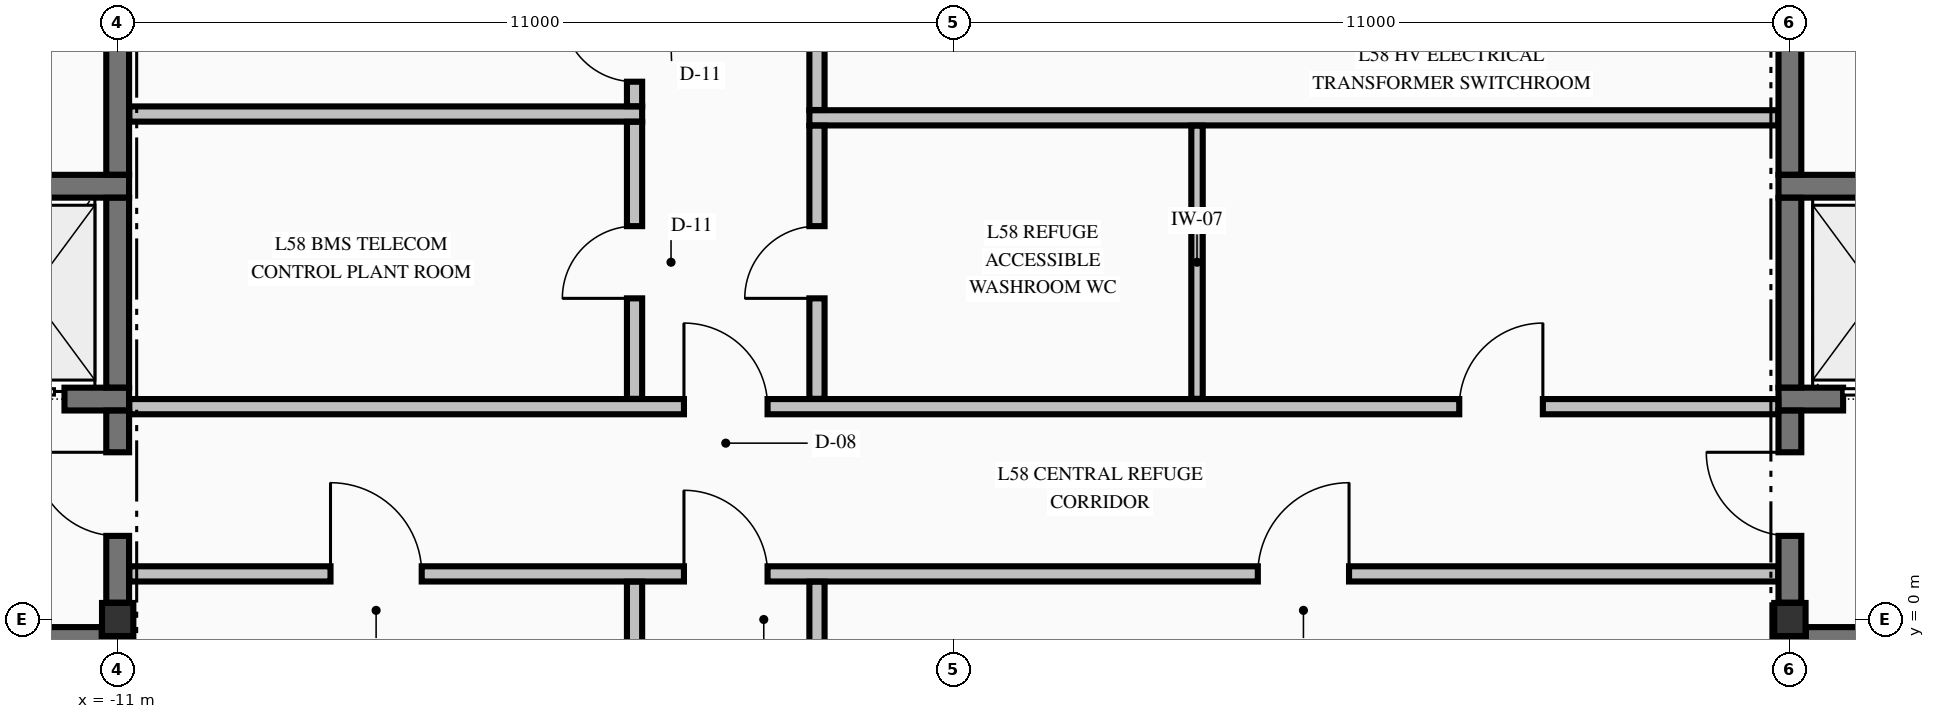
"""IFC4 building model, lengths in metres.
Left out: names, types, materials, properties, quantities, classifications, styles, units other than length and angle.
Written with IfcOpenShell. Run it as: python <this file> out.ifc"""

import sys

from ifc_helpers import new_model, si_unit, direction, frame, frame_2d, origin, origin_2d, place, context, subcontext, project, spatial, rectangle, i_section, extrude, element, fill, save


model = new_model("IFC4")
c1 = context("Model", 3, precision=1e-05, world=origin(), true_north=direction((0.0, 1.0)))
c2 = subcontext(c1, "Body", "Model", "MODEL_VIEW")
j1 = project(units=[si_unit("LENGTHUNIT", "METRE"), si_unit("PLANEANGLEUNIT", "RADIAN")], contexts=[c1])
p1 = place(None, origin())
s1 = spatial("IfcSite", under=j1, at=p1, CompositionType="ELEMENT")
p2 = place(p1, origin())
s2 = spatial("IfcBuilding", under=s1, at=p2, CompositionType="ELEMENT")
p3 = place(p2, frame((0.0, 0.0, 222.06)))
s3 = spatial("IfcBuildingStorey", under=s2, at=p3, CompositionType="ELEMENT", Elevation=222.06)
for number, where, z_axis, x_axis in (
    (1, (-11.0, 0.0, -0.425), (0.0, 0.0, 1.0), (1.0, 0.0, 0.0)),
    (2, (11.0, 0.0, -0.425), (0.0, 0.0, 1.0), (1.0, 0.0, 0.0)),
):
    element("IfcColumn", number, at=place(p3, frame(where, z_axis=z_axis, x_axis=x_axis)), inside=s3, PredefinedType="COLUMN", context=c2, shape_type="SweptSolid", body=[
        extrude(i_section(OverallWidth=0.412, OverallDepth=0.435, WebThickness=0.036, FlangeThickness=0.058, FilletRadius=0.015, at=origin_2d()), origin(), (0.0, 0.0, 1.0), 4.76),
    ])
p4 = place(p3, frame((-19.79, -0.25, 0.0), z_axis=(0.0, 0.0, 1.0), x_axis=(1.0, 0.0, 0.0)))
e3 = element("IfcWall", 3, at=p4, inside=s3, PredefinedType="SHEAR", context=c2, shape_type="SweptSolid", body=[
    extrude(rectangle(XDim=8.58, YDim=0.3, at=frame_2d((4.29, 0.0))), origin(), (0.0, 0.0, 1.0), 4.335),
])
p5 = place(p4, frame((6.09, 0.0, 0.0)))
e4 = element("IfcOpeningElement", 4, at=p5, cuts=e3, PredefinedType="OPENING", context=c2, shape_type="SweptSolid", body=[
    extrude(rectangle(XDim=1.1, YDim=2.15, at=frame_2d((0.55, 1.075))), frame((0.0, 0.16, 0.0), z_axis=(0.0, -1.0, 0.0), x_axis=(1.0, 0.0, 0.0)), (0.0, 0.0, 1.0), 0.32),
])
p6 = place(p3, frame((11.21, -0.25, 0.0), z_axis=(0.0, 0.0, 1.0), x_axis=(1.0, 0.0, 0.0)))
e5 = element("IfcWall", 5, at=p6, inside=s3, PredefinedType="SHEAR", context=c2, shape_type="SweptSolid", body=[
    extrude(rectangle(XDim=3.665, YDim=0.3, at=frame_2d((1.833, 0.0))), origin(), (0.0, 0.0, 1.0), 4.335),
])
p7 = place(p6, frame((1.39, 0.0, 0.0)))
e6 = element("IfcOpeningElement", 6, at=p7, cuts=e5, PredefinedType="OPENING", context=c2, shape_type="SweptSolid", body=[
    extrude(rectangle(XDim=1.1, YDim=2.15, at=frame_2d((0.55, 1.075))), frame((0.0, 0.16, 0.0), z_axis=(0.0, -1.0, 0.0), x_axis=(1.0, 0.0, 0.0)), (0.0, 0.0, 1.0), 0.32),
])
p8 = place(p3, frame((-14.875, 2.9, 0.0), z_axis=(0.0, 0.0, 1.0), x_axis=(1.0, 0.0, 0.0)))
e7 = element("IfcWall", 7, at=p8, inside=s3, PredefinedType="SHEAR", context=c2, shape_type="SweptSolid", body=[
    extrude(rectangle(XDim=4.025, YDim=0.3, at=frame_2d((2.012, 0.0))), origin(), (0.0, 0.0, 1.0), 4.335),
])
p9 = place(p8, frame((2.075, 0.0, 0.0)))
e8 = element("IfcOpeningElement", 8, at=p9, cuts=e7, PredefinedType="OPENING", context=c2, shape_type="SweptSolid", body=[
    extrude(rectangle(XDim=1.1, YDim=2.2, at=frame_2d((0.55, 1.1))), frame((0.0, 0.16, 0.0), z_axis=(0.0, -1.0, 0.0), x_axis=(1.0, 0.0, 0.0)), (0.0, 0.0, 1.0), 0.32),
])
p10 = place(p3, frame((10.85, 2.9, 0.0), z_axis=(0.0, 0.0, 1.0), x_axis=(1.0, 0.0, 0.0)))
e9 = element("IfcWall", 9, at=p10, inside=s3, PredefinedType="SHEAR", context=c2, shape_type="SweptSolid", body=[
    extrude(rectangle(XDim=4.025, YDim=0.3, at=frame_2d((2.012, 0.0))), origin(), (0.0, 0.0, 1.0), 4.335),
])
p11 = place(p10, frame((0.85, 0.0, 0.0)))
e10 = element("IfcOpeningElement", 10, at=p11, cuts=e9, PredefinedType="OPENING", context=c2, shape_type="SweptSolid", body=[
    extrude(rectangle(XDim=1.1, YDim=2.2, at=frame_2d((0.55, 1.1))), frame((0.0, 0.16, 0.0), z_axis=(0.0, -1.0, 0.0), x_axis=(1.0, 0.0, 0.0)), (0.0, 0.0, 1.0), 0.32),
])
for number, where, z_axis, x_axis in (
    (11, (-14.875, 5.7, 0.0), (0.0, 0.0, 1.0), (1.0, 0.0, 0.0)),
    (12, (10.85, 5.7, 0.0), (0.0, 0.0, 1.0), (1.0, 0.0, 0.0)),
):
    element("IfcWall", number, at=place(p3, frame(where, z_axis=z_axis, x_axis=x_axis)), inside=s3, PredefinedType="SHEAR", context=c2, shape_type="SweptSolid", body=[
        extrude(rectangle(XDim=4.025, YDim=0.3, at=frame_2d((2.012, 0.0))), origin(), (0.0, 0.0, 1.0), 4.335),
    ])
p12 = place(p3, frame((-10.847, 0.6, 0.0), z_axis=(0.0, 0.0, 1.0), x_axis=(1.0, 0.0, 0.0)))
e13 = element("IfcWall", 13, at=p12, inside=s3, PredefinedType="PARTITIONING", context=c2, shape_type="SweptSolid", body=[
    extrude(rectangle(XDim=21.694, YDim=0.2, at=frame_2d((10.847, 0.0))), origin(), (0.0, 0.0, 1.0), 4.335),
])
p13 = place(p12, frame((7.297, 0.0, 0.0)))
e14 = element("IfcOpeningElement", 14, at=p13, cuts=e13, PredefinedType="OPENING", context=c2, shape_type="SweptSolid", body=[
    extrude(rectangle(XDim=1.1, YDim=2.15, at=frame_2d((0.55, 1.075))), frame((0.0, 0.11, 0.0), z_axis=(0.0, -1.0, 0.0), x_axis=(1.0, 0.0, 0.0)), (0.0, 0.0, 1.0), 0.22),
])
p14 = place(p12, frame((2.647, 0.0, 0.0)))
e15 = element("IfcOpeningElement", 15, at=p14, cuts=e13, PredefinedType="OPENING", context=c2, shape_type="SweptSolid", body=[
    extrude(rectangle(XDim=1.2, YDim=2.15, at=frame_2d((0.6, 1.075))), frame((0.0, 0.11, 0.0), z_axis=(0.0, -1.0, 0.0), x_axis=(1.0, 0.0, 0.0)), (0.0, 0.0, 1.0), 0.22),
])
p15 = place(p12, frame((14.847, 0.0, 0.0)))
e16 = element("IfcOpeningElement", 16, at=p15, cuts=e13, PredefinedType="OPENING", context=c2, shape_type="SweptSolid", body=[
    extrude(rectangle(XDim=1.2, YDim=2.15, at=frame_2d((0.6, 1.075))), frame((0.0, 0.11, 0.0), z_axis=(0.0, -1.0, 0.0), x_axis=(1.0, 0.0, 0.0)), (0.0, 0.0, 1.0), 0.22),
])
p16 = place(p3, frame((-10.847, 2.8, 0.0), z_axis=(0.0, 0.0, 1.0), x_axis=(1.0, 0.0, 0.0)))
e17 = element("IfcWall", 17, at=p16, inside=s3, PredefinedType="PARTITIONING", context=c2, shape_type="SweptSolid", body=[
    extrude(rectangle(XDim=21.694, YDim=0.2, at=frame_2d((10.847, 0.0))), origin(), (0.0, 0.0, 1.0), 4.335),
])
p17 = place(p16, frame((7.297, 0.0, 0.0)))
e18 = element("IfcOpeningElement", 18, at=p17, cuts=e17, PredefinedType="OPENING", context=c2, shape_type="SweptSolid", body=[
    extrude(rectangle(XDim=1.1, YDim=2.15, at=frame_2d((0.55, 1.075))), frame((0.0, 0.11, 0.0), z_axis=(0.0, -1.0, 0.0), x_axis=(1.0, 0.0, 0.0)), (0.0, 0.0, 1.0), 0.22),
])
p18 = place(p16, frame((17.497, 0.0, 0.0)))
e19 = element("IfcOpeningElement", 19, at=p18, cuts=e17, PredefinedType="OPENING", context=c2, shape_type="SweptSolid", body=[
    extrude(rectangle(XDim=1.1, YDim=2.15, at=frame_2d((0.55, 1.075))), frame((0.0, 0.11, 0.0), z_axis=(0.0, -1.0, 0.0), x_axis=(1.0, 0.0, 0.0)), (0.0, 0.0, 1.0), 0.22),
])
p19 = place(p3, frame((-1.9, 6.6, 0.0), z_axis=(0.0, 0.0, 1.0), x_axis=(1.0, 0.0, 0.0)))
e20 = element("IfcWall", 20, at=p19, inside=s3, PredefinedType="PARTITIONING", context=c2, shape_type="SweptSolid", body=[
    extrude(rectangle(XDim=12.747, YDim=0.2, at=frame_2d((6.374, 0.0))), origin(), (0.0, 0.0, 1.0), 4.335),
])
p20 = place(p3, frame((-10.847, 6.65, 0.0), z_axis=(0.0, 0.0, 1.0), x_axis=(1.0, 0.0, 0.0)))
e21 = element("IfcWall", 21, at=p20, inside=s3, PredefinedType="PARTITIONING", context=c2, shape_type="SweptSolid", body=[
    extrude(rectangle(XDim=6.747, YDim=0.2, at=frame_2d((3.374, 0.0))), origin(), (0.0, 0.0, 1.0), 4.335),
])
p21 = place(p3, frame((-11.0, -9.729, 0.0), z_axis=(0.0, 0.0, 1.0), x_axis=(0.0, 1.0, 0.0)))
e22 = element("IfcWall", 22, at=p21, inside=s3, PredefinedType="SHEAR", context=c2, shape_type="SweptSolid", body=[
    extrude(rectangle(XDim=9.507, YDim=0.3, at=frame_2d((4.753, 0.0))), origin(), (0.0, 0.0, 1.0), 4.335),
])
p22 = place(p3, frame((-11.0, 0.221, 0.0), z_axis=(0.0, 0.0, 1.0), x_axis=(0.0, 1.0, 0.0)))
e23 = element("IfcWall", 23, at=p22, inside=s3, PredefinedType="SHEAR", context=c2, shape_type="SweptSolid", body=[
    extrude(rectangle(XDim=2.527, YDim=0.3, at=frame_2d((1.263, 0.0))), origin(), (0.0, 0.0, 1.0), 4.335),
])
p23 = place(p22, frame((0.878, 0.0, 0.0)))
e24 = element("IfcOpeningElement", 24, at=p23, cuts=e23, PredefinedType="OPENING", context=c2, shape_type="SweptSolid", body=[
    extrude(rectangle(XDim=1.1, YDim=2.15, at=frame_2d((0.55, 1.075))), frame((0.0, 0.16, 0.0), z_axis=(0.0, -1.0, 0.0), x_axis=(1.0, 0.0, 0.0)), (0.0, 0.0, 1.0), 0.32),
])
p24 = place(p3, frame((-11.0, 3.052, 0.0), z_axis=(0.0, 0.0, 1.0), x_axis=(0.0, 1.0, 0.0)))
e25 = element("IfcWall", 25, at=p24, inside=s3, PredefinedType="SHEAR", context=c2, shape_type="SweptSolid", body=[
    extrude(rectangle(XDim=2.496, YDim=0.3, at=frame_2d((1.248, 0.0))), origin(), (0.0, 0.0, 1.0), 4.335),
])
p25 = place(p3, frame((-11.0, 5.852, 0.0), z_axis=(0.0, 0.0, 1.0), x_axis=(0.0, 1.0, 0.0)))
e26 = element("IfcWall", 26, at=p25, inside=s3, PredefinedType="SHEAR", context=c2, shape_type="SweptSolid", body=[
    extrude(rectangle(XDim=4.427, YDim=0.3, at=frame_2d((2.213, 0.0))), origin(), (0.0, 0.0, 1.0), 4.335),
])
p26 = place(p3, frame((11.0, -9.729, 0.0), z_axis=(0.0, 0.0, 1.0), x_axis=(0.0, 1.0, 0.0)))
e27 = element("IfcWall", 27, at=p26, inside=s3, PredefinedType="SHEAR", context=c2, shape_type="SweptSolid", body=[
    extrude(rectangle(XDim=9.507, YDim=0.3, at=frame_2d((4.753, 0.0))), origin(), (0.0, 0.0, 1.0), 4.335),
])
p27 = place(p3, frame((11.0, 0.221, 0.0), z_axis=(0.0, 0.0, 1.0), x_axis=(0.0, 1.0, 0.0)))
e28 = element("IfcWall", 28, at=p27, inside=s3, PredefinedType="SHEAR", context=c2, shape_type="SweptSolid", body=[
    extrude(rectangle(XDim=2.527, YDim=0.3, at=frame_2d((1.263, 0.0))), origin(), (0.0, 0.0, 1.0), 4.335),
])
p28 = place(p27, frame((0.878, 0.0, 0.0)))
e29 = element("IfcOpeningElement", 29, at=p28, cuts=e28, PredefinedType="OPENING", context=c2, shape_type="SweptSolid", body=[
    extrude(rectangle(XDim=1.1, YDim=2.15, at=frame_2d((0.55, 1.075))), frame((0.0, 0.16, 0.0), z_axis=(0.0, -1.0, 0.0), x_axis=(1.0, 0.0, 0.0)), (0.0, 0.0, 1.0), 0.32),
])
p29 = place(p3, frame((11.0, 3.052, 0.0), z_axis=(0.0, 0.0, 1.0), x_axis=(0.0, 1.0, 0.0)))
e30 = element("IfcWall", 30, at=p29, inside=s3, PredefinedType="SHEAR", context=c2, shape_type="SweptSolid", body=[
    extrude(rectangle(XDim=2.496, YDim=0.3, at=frame_2d((1.248, 0.0))), origin(), (0.0, 0.0, 1.0), 4.335),
])
p30 = place(p3, frame((11.0, 5.852, 0.0), z_axis=(0.0, 0.0, 1.0), x_axis=(0.0, 1.0, 0.0)))
e31 = element("IfcWall", 31, at=p30, inside=s3, PredefinedType="SHEAR", context=c2, shape_type="SweptSolid", body=[
    extrude(rectangle(XDim=4.427, YDim=0.3, at=frame_2d((2.213, 0.0))), origin(), (0.0, 0.0, 1.0), 4.335),
])
p31 = place(p3, frame((-4.2, -9.847, 0.0), z_axis=(0.0, 0.0, 1.0), x_axis=(0.0, 1.0, 0.0)))
e32 = element("IfcWall", 32, at=p31, inside=s3, PredefinedType="PARTITIONING", context=c2, shape_type="SweptSolid", body=[
    extrude(rectangle(XDim=10.344, YDim=0.2, at=frame_2d((5.172, 0.0))), origin(), (0.0, 0.0, 1.0), 4.335),
])
p32 = place(p3, frame((-4.2, 2.903, 0.0), z_axis=(0.0, 0.0, 1.0), x_axis=(0.0, 1.0, 0.0)))
e33 = element("IfcWall", 33, at=p32, inside=s3, PredefinedType="PARTITIONING", context=c2, shape_type="SweptSolid", body=[
    extrude(rectangle(XDim=3.644, YDim=0.2, at=frame_2d((1.822, 0.0))), origin(), (0.0, 0.0, 1.0), 4.335),
])
p33 = place(p32, frame((1.322, 0.0, 0.0)))
e34 = element("IfcOpeningElement", 34, at=p33, cuts=e33, PredefinedType="OPENING", context=c2, shape_type="SweptSolid", body=[
    extrude(rectangle(XDim=0.95, YDim=2.15, at=frame_2d((0.475, 1.075))), frame((0.0, 0.11, 0.0), z_axis=(0.0, -1.0, 0.0), x_axis=(1.0, 0.0, 0.0)), (0.0, 0.0, 1.0), 0.22),
])
p34 = place(p3, frame((-4.2, 6.753, 0.0), z_axis=(0.0, 0.0, 1.0), x_axis=(0.0, 1.0, 0.0)))
e35 = element("IfcWall", 35, at=p34, inside=s3, PredefinedType="PARTITIONING", context=c2, shape_type="SweptSolid", body=[
    extrude(rectangle(XDim=3.644, YDim=0.2, at=frame_2d((1.822, 0.0))), origin(), (0.0, 0.0, 1.0), 4.335),
])
p35 = place(p34, frame((0.322, 0.0, 0.0)))
e36 = element("IfcOpeningElement", 36, at=p35, cuts=e35, PredefinedType="OPENING", context=c2, shape_type="SweptSolid", body=[
    extrude(rectangle(XDim=0.95, YDim=2.15, at=frame_2d((0.475, 1.075))), frame((0.0, 0.11, 0.0), z_axis=(0.0, -1.0, 0.0), x_axis=(1.0, 0.0, 0.0)), (0.0, 0.0, 1.0), 0.22),
])
p36 = place(p3, frame((-1.8, -9.847, 0.0), z_axis=(0.0, 0.0, 1.0), x_axis=(0.0, 1.0, 0.0)))
e37 = element("IfcWall", 37, at=p36, inside=s3, PredefinedType="PARTITIONING", context=c2, shape_type="SweptSolid", body=[
    extrude(rectangle(XDim=10.344, YDim=0.2, at=frame_2d((5.172, 0.0))), origin(), (0.0, 0.0, 1.0), 4.335),
])
p37 = place(p3, frame((-1.8, 2.903, 0.0), z_axis=(0.0, 0.0, 1.0), x_axis=(0.0, 1.0, 0.0)))
e38 = element("IfcWall", 38, at=p37, inside=s3, PredefinedType="PARTITIONING", context=c2, shape_type="SweptSolid", body=[
    extrude(rectangle(XDim=3.594, YDim=0.2, at=frame_2d((1.797, 0.0))), origin(), (0.0, 0.0, 1.0), 4.335),
])
p38 = place(p37, frame((1.322, 0.0, 0.0)))
e39 = element("IfcOpeningElement", 39, at=p38, cuts=e38, PredefinedType="OPENING", context=c2, shape_type="SweptSolid", body=[
    extrude(rectangle(XDim=0.95, YDim=2.15, at=frame_2d((0.475, 1.075))), frame((0.0, 0.11, 0.0), z_axis=(0.0, -1.0, 0.0), x_axis=(1.0, 0.0, 0.0)), (0.0, 0.0, 1.0), 0.22),
])
p39 = place(p3, frame((-1.8, 6.703, 0.0), z_axis=(0.0, 0.0, 1.0), x_axis=(0.0, 1.0, 0.0)))
e40 = element("IfcWall", 40, at=p39, inside=s3, PredefinedType="PARTITIONING", context=c2, shape_type="SweptSolid", body=[
    extrude(rectangle(XDim=3.694, YDim=0.2, at=frame_2d((1.847, 0.0))), origin(), (0.0, 0.0, 1.0), 4.335),
])
p40 = place(p3, frame((3.2, 2.903, 0.0), z_axis=(0.0, 0.0, 1.0), x_axis=(0.0, 1.0, 0.0)))
e41 = element("IfcWall", 41, at=p40, inside=s3, PredefinedType="PARTITIONING", context=c2, shape_type="SweptSolid", body=[
    extrude(rectangle(XDim=3.594, YDim=0.15, at=frame_2d((1.797, 0.0))), origin(), (0.0, 0.0, 1.0), 4.335),
])
p41 = place(p23, origin())
e42 = element("IfcDoor", 42, at=p41, inside=s3, OperationType="SINGLE_SWING_RIGHT", PredefinedType="DOOR", context=c2, shape_type="SweptSolid", body=[
    extrude(rectangle(XDim=1.1, YDim=2.15, at=frame_2d((0.55, 1.075))), frame((0.0, 0.025, 0.0), z_axis=(0.0, -1.0, 0.0), x_axis=(1.0, 0.0, 0.0)), (0.0, 0.0, 1.0), 0.05),
])
fill(e24, e42)
p42 = place(p9, origin())
e43 = element("IfcDoor", 43, at=p42, inside=s3, OperationType="SLIDING_TO_LEFT", PredefinedType="DOOR", context=c2, shape_type="SweptSolid", body=[
    extrude(rectangle(XDim=1.1, YDim=2.2, at=frame_2d((0.55, 1.1))), frame((0.0, 0.025, 0.0), z_axis=(0.0, -1.0, 0.0), x_axis=(1.0, 0.0, 0.0)), (0.0, 0.0, 1.0), 0.05),
])
fill(e8, e43)
p43 = place(p28, origin())
e44 = element("IfcDoor", 44, at=p43, inside=s3, OperationType="SINGLE_SWING_RIGHT", PredefinedType="DOOR", context=c2, shape_type="SweptSolid", body=[
    extrude(rectangle(XDim=1.1, YDim=2.15, at=frame_2d((0.55, 1.075))), frame((0.0, 0.025, 0.0), z_axis=(0.0, -1.0, 0.0), x_axis=(1.0, 0.0, 0.0)), (0.0, 0.0, 1.0), 0.05),
])
fill(e29, e44)
p44 = place(p11, origin())
e45 = element("IfcDoor", 45, at=p44, inside=s3, OperationType="SLIDING_TO_RIGHT", PredefinedType="DOOR", context=c2, shape_type="SweptSolid", body=[
    extrude(rectangle(XDim=1.1, YDim=2.2, at=frame_2d((0.55, 1.1))), frame((0.0, 0.025, 0.0), z_axis=(0.0, -1.0, 0.0), x_axis=(1.0, 0.0, 0.0)), (0.0, 0.0, 1.0), 0.05),
])
fill(e10, e45)
p45 = place(p17, origin())
e46 = element("IfcDoor", 46, at=p45, inside=s3, OperationType="SINGLE_SWING_LEFT", PredefinedType="DOOR", context=c2, shape_type="SweptSolid", body=[
    extrude(rectangle(XDim=1.1, YDim=2.15, at=frame_2d((0.55, 1.075))), frame((0.0, 0.025, 0.0), z_axis=(0.0, -1.0, 0.0), x_axis=(1.0, 0.0, 0.0)), (0.0, 0.0, 1.0), 0.05),
])
fill(e18, e46)
p46 = place(p13, origin())
e47 = element("IfcDoor", 47, at=p46, inside=s3, OperationType="SINGLE_SWING_LEFT", PredefinedType="DOOR", context=c2, shape_type="SweptSolid", body=[
    extrude(rectangle(XDim=1.1, YDim=2.15, at=frame_2d((0.55, 1.075))), frame((0.0, 0.025, 0.0), z_axis=(0.0, -1.0, 0.0), x_axis=(1.0, 0.0, 0.0)), (0.0, 0.0, 1.0), 0.05),
])
fill(e14, e47)
p47 = place(p14, origin())
e48 = element("IfcDoor", 48, at=p47, inside=s3, OperationType="SINGLE_SWING_LEFT", PredefinedType="DOOR", context=c2, shape_type="SweptSolid", body=[
    extrude(rectangle(XDim=1.2, YDim=2.15, at=frame_2d((0.6, 1.075))), frame((0.0, 0.025, 0.0), z_axis=(0.0, -1.0, 0.0), x_axis=(1.0, 0.0, 0.0)), (0.0, 0.0, 1.0), 0.05),
])
fill(e15, e48)
p48 = place(p15, origin())
e49 = element("IfcDoor", 49, at=p48, inside=s3, OperationType="SINGLE_SWING_RIGHT", PredefinedType="DOOR", context=c2, shape_type="SweptSolid", body=[
    extrude(rectangle(XDim=1.2, YDim=2.15, at=frame_2d((0.6, 1.075))), frame((0.0, 0.025, 0.0), z_axis=(0.0, -1.0, 0.0), x_axis=(1.0, 0.0, 0.0)), (0.0, 0.0, 1.0), 0.05),
])
fill(e16, e49)
p49 = place(p33, origin())
e50 = element("IfcDoor", 50, at=p49, inside=s3, OperationType="SINGLE_SWING_LEFT", PredefinedType="DOOR", context=c2, shape_type="SweptSolid", body=[
    extrude(rectangle(XDim=0.95, YDim=2.15, at=frame_2d((0.475, 1.075))), frame((0.0, 0.025, 0.0), z_axis=(0.0, -1.0, 0.0), x_axis=(1.0, 0.0, 0.0)), (0.0, 0.0, 1.0), 0.05),
])
fill(e34, e50)
p50 = place(p35, origin())
e51 = element("IfcDoor", 51, at=p50, inside=s3, OperationType="SINGLE_SWING_RIGHT", PredefinedType="DOOR", context=c2, shape_type="SweptSolid", body=[
    extrude(rectangle(XDim=0.95, YDim=2.15, at=frame_2d((0.475, 1.075))), frame((0.0, 0.025, 0.0), z_axis=(0.0, -1.0, 0.0), x_axis=(1.0, 0.0, 0.0)), (0.0, 0.0, 1.0), 0.05),
])
fill(e36, e51)
p51 = place(p38, origin())
e52 = element("IfcDoor", 52, at=p51, inside=s3, OperationType="SINGLE_SWING_LEFT", PredefinedType="DOOR", context=c2, shape_type="SweptSolid", body=[
    extrude(rectangle(XDim=0.95, YDim=2.15, at=frame_2d((0.475, 1.075))), frame((0.0, 0.025, 0.0), z_axis=(0.0, -1.0, 0.0), x_axis=(1.0, 0.0, 0.0)), (0.0, 0.0, 1.0), 0.05),
])
fill(e39, e52)
p52 = place(p18, origin())
e53 = element("IfcDoor", 53, at=p52, inside=s3, OperationType="SINGLE_SWING_RIGHT", PredefinedType="DOOR", context=c2, shape_type="SweptSolid", body=[
    extrude(rectangle(XDim=1.1, YDim=2.15, at=frame_2d((0.55, 1.075))), frame((0.0, 0.025, 0.0), z_axis=(0.0, -1.0, 0.0), x_axis=(1.0, 0.0, 0.0)), (0.0, 0.0, 1.0), 0.05),
])
fill(e19, e53)
save(model, sys.argv[1])
